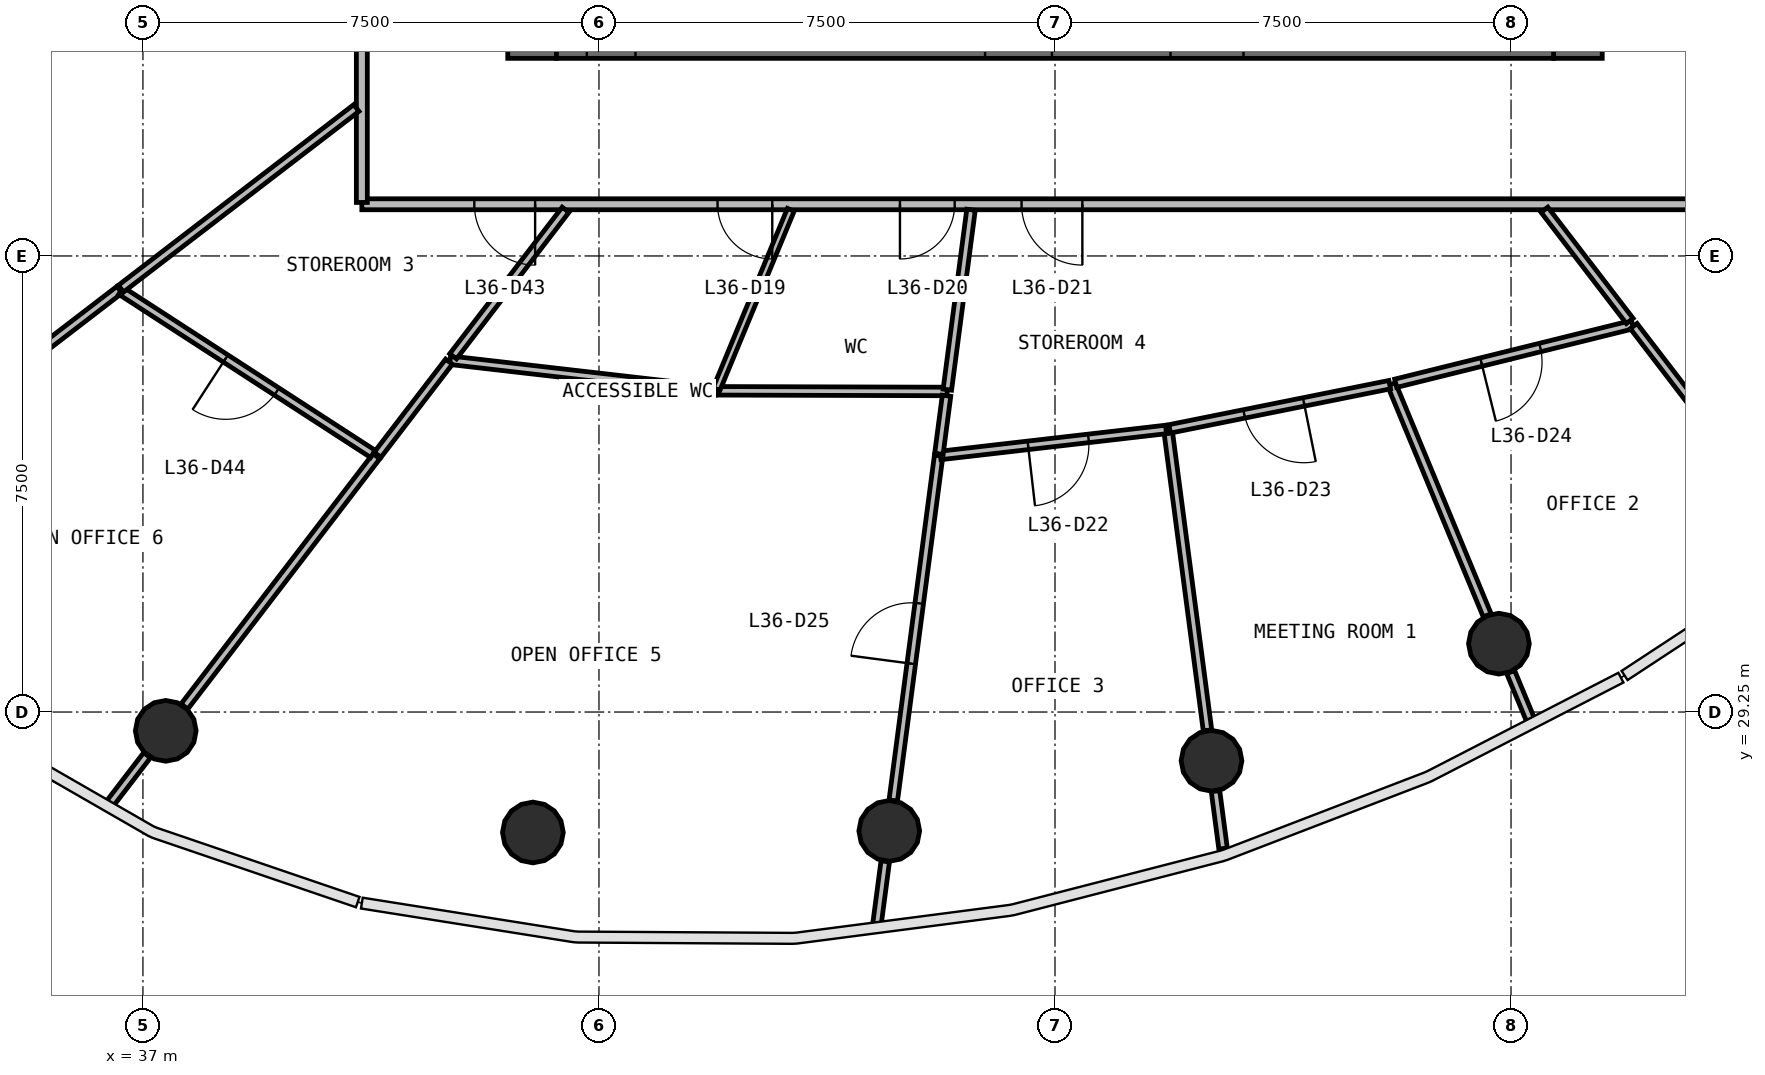
"""IFC4 building model, lengths in metres.
Left out: names, types, materials, properties, quantities, classifications, styles, units other than length and angle.
Written with IfcOpenShell. Run it as: python <this file> out.ifc"""

import sys

from ifc_helpers import new_model, si_unit, direction, frame, frame_2d, origin, origin_2d, place, context, subcontext, project, spatial, rectangle, circle, extrude, source, transform, mapped, element, fill, save


model = new_model("IFC4")
c1 = context("Model", 3, precision=1e-05, world=origin(), true_north=direction((0.0, 1.0)))
c2 = subcontext(c1, "Body", "Model", "MODEL_VIEW")
j1 = project(units=[si_unit("LENGTHUNIT", "METRE"), si_unit("PLANEANGLEUNIT", "RADIAN")], contexts=[c1])
p1 = place(None, origin())
s1 = spatial("IfcSite", under=j1, at=p1, CompositionType="ELEMENT")
p2 = place(p1, origin())
s2 = spatial("IfcBuilding", under=s1, at=p2, CompositionType="ELEMENT")
p3 = place(p2, frame((0.0, 0.0, 152.6)))
s3 = spatial("IfcBuildingStorey", under=s2, at=p3, CompositionType="ELEMENT", Elevation=152.6)
p4 = place(p3, frame((60.6, 40.0, 0.0), z_axis=(0.0, 0.0, 1.0), x_axis=(0.0, 1.0, 0.0)))
e1 = element("IfcWall", 1, at=p4, inside=s3, PredefinedType="SHEAR", context=c2, shape_type="SweptSolid", body=[
    extrude(rectangle(XDim=16.0, YDim=0.8, at=frame_2d((8.0, 0.0))), origin(), (0.0, 0.0, 1.0), 3.9),
])
p5 = place(p4, frame((7.1, 0.0, 0.0)))
e2 = element("IfcOpeningElement", 2, at=p5, cuts=e1, PredefinedType="OPENING", context=c2, shape_type="SweptSolid", body=[
    extrude(rectangle(XDim=1.8, YDim=2.1, at=frame_2d((0.9, 1.05))), frame((0.0, 0.41, 0.0), z_axis=(0.0, -1.0, 0.0), x_axis=(1.0, 0.0, 0.0)), (0.0, 0.0, 1.0), 0.82),
])
p6 = place(p3, frame((43.4, 56.0, 0.0), z_axis=(0.0, 0.0, 1.0), x_axis=(0.0, -1.0, 0.0)))
e3 = element("IfcWall", 3, at=p6, inside=s3, PredefinedType="SHEAR", context=c2, shape_type="SweptSolid", body=[
    extrude(rectangle(XDim=16.0, YDim=0.8, at=frame_2d((8.0, 0.0))), origin(), (0.0, 0.0, 1.0), 3.9),
])
p7 = place(p6, frame((7.1, 0.0, 0.0)))
e4 = element("IfcOpeningElement", 4, at=p7, cuts=e3, PredefinedType="OPENING", context=c2, shape_type="SweptSolid", body=[
    extrude(rectangle(XDim=1.8, YDim=2.1, at=frame_2d((0.9, 1.05))), frame((0.0, 0.41, 0.0), z_axis=(0.0, -1.0, 0.0), x_axis=(1.0, 0.0, 0.0)), (0.0, 0.0, 1.0), 0.82),
])
p8 = place(p3, frame((43.8, 40.4, 0.0), z_axis=(0.0, 0.0, 1.0), x_axis=(1.0, 0.0, 0.0)))
e5 = element("IfcWall", 5, at=p8, inside=s3, PredefinedType="SHEAR", context=c2, shape_type="SweptSolid", body=[
    extrude(rectangle(XDim=16.4, YDim=0.8, at=frame_2d((8.2, 0.0))), origin(), (0.0, 0.0, 1.0), 3.9),
])
p9 = place(p8, frame((10.1, 0.0, 0.0)))
e6 = element("IfcOpeningElement", 6, at=p9, cuts=e5, PredefinedType="OPENING", context=c2, shape_type="SweptSolid", body=[
    extrude(rectangle(XDim=1.2, YDim=2.1, at=frame_2d((0.6, 1.05))), frame((0.0, 0.41, 0.0), z_axis=(0.0, -1.0, 0.0), x_axis=(1.0, 0.0, 0.0)), (0.0, 0.0, 1.0), 0.82),
])
p10 = place(p8, frame((7.05, 0.0, 0.0)))
e7 = element("IfcOpeningElement", 7, at=p10, cuts=e5, PredefinedType="OPENING", context=c2, shape_type="SweptSolid", body=[
    extrude(rectangle(XDim=1.1, YDim=2.1, at=frame_2d((0.55, 1.05))), frame((0.0, 0.41, 0.0), z_axis=(0.0, -1.0, 0.0), x_axis=(1.0, 0.0, 0.0)), (0.0, 0.0, 1.0), 0.82),
])
p11 = place(p8, frame((0.5, 0.0, 0.0)))
e8 = element("IfcOpeningElement", 8, at=p11, cuts=e5, PredefinedType="OPENING", context=c2, shape_type="SweptSolid", body=[
    extrude(rectangle(XDim=0.8, YDim=2.1, at=frame_2d((0.4, 1.05))), frame((0.0, 0.41, 0.0), z_axis=(0.0, -1.0, 0.0), x_axis=(1.0, 0.0, 0.0)), (0.0, 0.0, 1.0), 0.82),
])
m1 = source(origin(), c2, "Body", "SweptSolid", [
    extrude(circle(Radius=0.5, at=origin_2d()), origin(), (0.0, 0.0, 1.0), 3.9),
])
for number, where, z_axis, x_axis in (
    (9, (37.375, 28.94, 0.0), (0.0, 0.0, 1.0), (1.0, 0.0, 0.0)),
    (10, (43.413, 27.269, 0.0), (0.0, 0.0, 1.0), (1.0, 0.0, 0.0)),
    (11, (49.274, 27.295, 0.0), (0.0, 0.0, 1.0), (1.0, 0.0, 0.0)),
    (12, (54.574, 28.449, 0.0), (0.0, 0.0, 1.0), (1.0, 0.0, 0.0)),
    (13, (59.301, 30.374, 0.0), (0.0, 0.0, 1.0), (1.0, 0.0, 0.0)),
):
    element("IfcColumn", number, at=place(p3, frame(where, z_axis=z_axis, x_axis=x_axis)), inside=s3, PredefinedType="COLUMN", context=c2, shape_type="MappedRepresentation", body=[
        mapped(m1, transform((0.0, 0.0, 0.0), scale=1.0)),
    ])
p12 = place(p3, frame((63.4, 37.6, 0.0), z_axis=(0.0, 0.0, 1.0), x_axis=(-1.0, 0.0, 0.0)))
e14 = element("IfcWall", 14, at=p12, inside=s3, PredefinedType="PARTITIONING", context=c2, shape_type="SweptSolid", body=[
    extrude(rectangle(XDim=22.8, YDim=0.18, at=frame_2d((11.4, 0.0))), origin(), (0.0, 0.0, 1.0), 2.88),
])
p13 = place(p12, frame((16.05, 0.0, 0.0)))
e15 = element("IfcOpeningElement", 15, at=p13, cuts=e14, PredefinedType="OPENING", context=c2, shape_type="SweptSolid", body=[
    extrude(rectangle(XDim=0.9, YDim=2.1, at=frame_2d((0.45, 1.05))), frame((0.0, 0.1, 0.0), z_axis=(0.0, -1.0, 0.0), x_axis=(1.0, 0.0, 0.0)), (0.0, 0.0, 1.0), 0.2),
])
p14 = place(p12, frame((13.05, 0.0, 0.0)))
e16 = element("IfcOpeningElement", 16, at=p14, cuts=e14, PredefinedType="OPENING", context=c2, shape_type="SweptSolid", body=[
    extrude(rectangle(XDim=0.9, YDim=2.1, at=frame_2d((0.45, 1.05))), frame((0.0, 0.1, 0.0), z_axis=(0.0, -1.0, 0.0), x_axis=(1.0, 0.0, 0.0)), (0.0, 0.0, 1.0), 0.2),
])
p15 = place(p12, frame((10.95, 0.0, 0.0)))
e17 = element("IfcOpeningElement", 17, at=p15, cuts=e14, PredefinedType="OPENING", context=c2, shape_type="SweptSolid", body=[
    extrude(rectangle(XDim=1.0, YDim=2.1, at=frame_2d((0.5, 1.05))), frame((0.0, 0.1, 0.0), z_axis=(0.0, -1.0, 0.0), x_axis=(1.0, 0.0, 0.0)), (0.0, 0.0, 1.0), 0.2),
])
p16 = place(p12, frame((19.95, 0.0, 0.0)))
e18 = element("IfcOpeningElement", 18, at=p16, cuts=e14, PredefinedType="OPENING", context=c2, shape_type="SweptSolid", body=[
    extrude(rectangle(XDim=1.0, YDim=2.1, at=frame_2d((0.5, 1.05))), frame((0.0, 0.1, 0.0), z_axis=(0.0, -1.0, 0.0), x_axis=(1.0, 0.0, 0.0)), (0.0, 0.0, 1.0), 0.2),
])
p17 = place(p3, frame((40.6, 37.63, 0.0), z_axis=(0.0, 0.0, 1.0), x_axis=(0.0, 1.0, 0.0)))
e19 = element("IfcWall", 19, at=p17, inside=s3, PredefinedType="PARTITIONING", context=c2, shape_type="SweptSolid", body=[
    extrude(rectangle(XDim=20.74, YDim=0.18, at=frame_2d((10.37, 0.0))), origin(), (0.0, 0.0, 1.0), 2.88),
])
p18 = place(p17, frame((9.89, 0.0, 0.0)))
e20 = element("IfcOpeningElement", 20, at=p18, cuts=e19, PredefinedType="OPENING", context=c2, shape_type="SweptSolid", body=[
    extrude(rectangle(XDim=1.0, YDim=2.1, at=frame_2d((0.5, 1.05))), frame((0.0, 0.1, 0.0), z_axis=(0.0, -1.0, 0.0), x_axis=(1.0, 0.0, 0.0)), (0.0, 0.0, 1.0), 0.2),
])
p19 = place(p17, frame((4.29, 0.0, 0.0)))
e21 = element("IfcOpeningElement", 21, at=p19, cuts=e19, PredefinedType="OPENING", context=c2, shape_type="SweptSolid", body=[
    extrude(rectangle(XDim=1.0, YDim=2.1, at=frame_2d((0.5, 1.05))), frame((0.0, 0.1, 0.0), z_axis=(0.0, -1.0, 0.0), x_axis=(1.0, 0.0, 0.0)), (0.0, 0.0, 1.0), 0.2),
])
p20 = place(p3, frame((49.34, 27.795, 0.0), z_axis=(0.0, 0.0, 1.0), x_axis=(0.13055608231, 0.99144092581, 0.0)))
e22 = element("IfcWall", 22, at=p20, inside=s3, PredefinedType="PARTITIONING", context=c2, shape_type="SweptSolid", body=[
    extrude(rectangle(XDim=5.72, YDim=0.14, at=frame_2d((2.86, 0.0))), origin(), (0.0, 0.0, 1.0), 2.88),
])
p21 = place(p20, frame((2.271, 0.0, 0.0)))
e23 = element("IfcOpeningElement", 23, at=p21, cuts=e22, PredefinedType="OPENING", context=c2, shape_type="SweptSolid", body=[
    extrude(rectangle(XDim=1.0, YDim=2.1, at=frame_2d((0.5, 1.05))), frame((0.0, 0.08, 0.0), z_axis=(0.0, -1.0, 0.0), x_axis=(1.0, 0.0, 0.0)), (0.0, 0.0, 1.0), 0.16),
])
p22 = place(p3, frame((40.841, 33.457, 0.0), z_axis=(0.0, 0.0, 1.0), x_axis=(-0.608780216018, -0.793338924159, 0.0)))
e24 = element("IfcWall", 24, at=p22, inside=s3, PredefinedType="PARTITIONING", context=c2, shape_type="SweptSolid", body=[
    extrude(rectangle(XDim=5.188, YDim=0.14, at=frame_2d((2.594, 0.0))), origin(), (0.0, 0.0, 1.0), 2.88),
])
p23 = place(p3, frame((36.614, 36.194, 0.0), z_axis=(0.0, 0.0, 1.0), x_axis=(-0.79337017358, -0.608739490811, 0.0)))
e25 = element("IfcWall", 25, at=p23, inside=s3, PredefinedType="PARTITIONING", context=c2, shape_type="SweptSolid", body=[
    extrude(rectangle(XDim=5.092, YDim=0.14, at=frame_2d((2.546, 0.0))), origin(), (0.0, 0.0, 1.0), 2.88),
])
p24 = place(p3, frame((40.782, 33.495, 0.0), z_axis=(0.0, 0.0, 1.0), x_axis=(-0.839336490457, 0.543612229247, 0.0)))
e26 = element("IfcWall", 26, at=p24, inside=s3, PredefinedType="PARTITIONING", context=c2, shape_type="SweptSolid", body=[
    extrude(rectangle(XDim=4.935, YDim=0.14, at=frame_2d((2.468, 0.0))), origin(), (0.0, 0.0, 1.0), 2.88),
])
p25 = place(p24, frame((1.885, 0.0, 0.0)))
e27 = element("IfcOpeningElement", 27, at=p25, cuts=e26, PredefinedType="OPENING", context=c2, shape_type="SweptSolid", body=[
    extrude(rectangle(XDim=1.0, YDim=2.1, at=frame_2d((0.5, 1.05))), frame((0.0, 0.08, 0.0), z_axis=(0.0, -1.0, 0.0), x_axis=(1.0, 0.0, 0.0)), (0.0, 0.0, 1.0), 0.16),
])
p26 = place(p3, frame((40.51, 39.183, 0.0), z_axis=(0.0, 0.0, 1.0), x_axis=(-0.793354275357, -0.608760210405, 0.0)))
e28 = element("IfcWall", 28, at=p26, inside=s3, PredefinedType="PARTITIONING", context=c2, shape_type="SweptSolid", body=[
    extrude(rectangle(XDim=4.88, YDim=0.14, at=frame_2d((2.44, 0.0))), origin(), (0.0, 0.0, 1.0), 2.88),
])
p27 = place(p3, frame((53.856, 33.9, 0.0), z_axis=(0.0, 0.0, 1.0), x_axis=(0.130517737487, -0.991445974424, 0.0)))
e29 = element("IfcWall", 29, at=p27, inside=s3, PredefinedType="PARTITIONING", context=c2, shape_type="SweptSolid", body=[
    extrude(rectangle(XDim=4.994, YDim=0.14, at=frame_2d((2.497, 0.0))), origin(), (0.0, 0.0, 1.0), 2.88),
])
p28 = place(p3, frame((42.052, 35.035, 0.0), z_axis=(0.0, 0.0, 1.0), x_axis=(0.993448498383, -0.114280711669, 0.0)))
e30 = element("IfcWall", 30, at=p28, inside=s3, PredefinedType="PARTITIONING", context=c2, shape_type="SweptSolid", body=[
    extrude(rectangle(XDim=4.399, YDim=0.14, at=frame_2d((2.199, 0.0))), origin(), (0.0, 0.0, 1.0), 2.88),
])
p29 = place(p3, frame((57.534, 34.639, 0.0), z_axis=(0.0, 0.0, 1.0), x_axis=(0.382696163026, -0.923874259196, 0.0)))
e31 = element("IfcWall", 31, at=p29, inside=s3, PredefinedType="PARTITIONING", context=c2, shape_type="SweptSolid", body=[
    extrude(rectangle(XDim=4.112, YDim=0.14, at=frame_2d((2.056, 0.0))), origin(), (0.0, 0.0, 1.0), 2.88),
])
p30 = place(p3, frame((61.499, 35.621, 0.0), z_axis=(0.0, 0.0, 1.0), x_axis=(-0.970705214058, -0.240273567836, 0.0)))
e32 = element("IfcWall", 32, at=p30, inside=s3, PredefinedType="PARTITIONING", context=c2, shape_type="SweptSolid", body=[
    extrude(rectangle(XDim=4.014, YDim=0.14, at=frame_2d((2.007, 0.0))), origin(), (0.0, 0.0, 1.0), 2.88),
])
p31 = place(p30, frame((1.563, 0.0, 0.0)))
e33 = element("IfcOpeningElement", 33, at=p31, cuts=e32, PredefinedType="OPENING", context=c2, shape_type="SweptSolid", body=[
    extrude(rectangle(XDim=1.0, YDim=2.1, at=frame_2d((0.5, 1.05))), frame((0.0, 0.08, 0.0), z_axis=(0.0, -1.0, 0.0), x_axis=(1.0, 0.0, 0.0)), (0.0, 0.0, 1.0), 0.16),
])
p32 = place(p3, frame((46.452, 34.532, 0.0), z_axis=(0.0, 0.0, 1.0), x_axis=(0.999995948964, -0.002846411033, 0.0)))
e34 = element("IfcWall", 34, at=p32, inside=s3, PredefinedType="PARTITIONING", context=c2, shape_type="SweptSolid", body=[
    extrude(rectangle(XDim=3.774, YDim=0.14, at=frame_2d((1.887, 0.0))), origin(), (0.0, 0.0, 1.0), 2.88),
])
p33 = place(p3, frame((53.826, 33.897, 0.0), z_axis=(0.0, 0.0, 1.0), x_axis=(-0.993434107381, -0.114405744138, 0.0)))
e35 = element("IfcWall", 35, at=p33, inside=s3, PredefinedType="PARTITIONING", context=c2, shape_type="SweptSolid", body=[
    extrude(rectangle(XDim=3.734, YDim=0.14, at=frame_2d((1.867, 0.0))), origin(), (0.0, 0.0, 1.0), 2.88),
])
p34 = place(p33, frame((1.285, 0.0, 0.0)))
e36 = element("IfcOpeningElement", 36, at=p34, cuts=e35, PredefinedType="OPENING", context=c2, shape_type="SweptSolid", body=[
    extrude(rectangle(XDim=1.0, YDim=2.1, at=frame_2d((0.5, 1.05))), frame((0.0, 0.08, 0.0), z_axis=(0.0, -1.0, 0.0), x_axis=(1.0, 0.0, 0.0)), (0.0, 0.0, 1.0), 0.16),
])
p35 = place(p3, frame((57.505, 34.634, 0.0), z_axis=(0.0, 0.0, 1.0), x_axis=(-0.980399657824, -0.197019062376, 0.0)))
e37 = element("IfcWall", 37, at=p35, inside=s3, PredefinedType="PARTITIONING", context=c2, shape_type="SweptSolid", body=[
    extrude(rectangle(XDim=3.691, YDim=0.14, at=frame_2d((1.846, 0.0))), origin(), (0.0, 0.0, 1.0), 2.88),
])
p36 = place(p35, frame((1.441, 0.0, 0.0)))
e38 = element("IfcOpeningElement", 38, at=p36, cuts=e37, PredefinedType="OPENING", context=c2, shape_type="SweptSolid", body=[
    extrude(rectangle(XDim=1.0, YDim=2.1, at=frame_2d((0.5, 1.05))), frame((0.0, 0.08, 0.0), z_axis=(0.0, -1.0, 0.0), x_axis=(1.0, 0.0, 0.0)), (0.0, 0.0, 1.0), 0.16),
])
p37 = place(p3, frame((43.951, 37.51, 0.0), z_axis=(0.0, 0.0, 1.0), x_axis=(-0.608758797461, -0.793355359542, 0.0)))
e39 = element("IfcWall", 39, at=p37, inside=s3, PredefinedType="PARTITIONING", context=c2, shape_type="SweptSolid", body=[
    extrude(rectangle(XDim=3.038, YDim=0.14, at=frame_2d((1.519, 0.0))), origin(), (0.0, 0.0, 1.0), 2.88),
])
p38 = place(p3, frame((50.619, 37.51, 0.0), z_axis=(0.0, 0.0, 1.0), x_axis=(-0.13049684078, -0.991448725122, 0.0)))
e40 = element("IfcWall", 40, at=p38, inside=s3, PredefinedType="PARTITIONING", context=c2, shape_type="SweptSolid", body=[
    extrude(rectangle(XDim=2.984, YDim=0.14, at=frame_2d((1.492, 0.0))), origin(), (0.0, 0.0, 1.0), 2.88),
])
p39 = place(p3, frame((61.517, 35.597, 0.0), z_axis=(0.0, 0.0, 1.0), x_axis=(0.608716333524, -0.793387941238, 0.0)))
e41 = element("IfcWall", 41, at=p39, inside=s3, PredefinedType="PARTITIONING", context=c2, shape_type="SweptSolid", body=[
    extrude(rectangle(XDim=2.825, YDim=0.14, at=frame_2d((1.413, 0.0))), origin(), (0.0, 0.0, 1.0), 2.88),
])
p40 = place(p3, frame((60.049, 37.51, 0.0), z_axis=(0.0, 0.0, 1.0), x_axis=(0.608742818772, -0.793367620081, 0.0)))
e42 = element("IfcWall", 42, at=p40, inside=s3, PredefinedType="PARTITIONING", context=c2, shape_type="SweptSolid", body=[
    extrude(rectangle(XDim=2.305, YDim=0.14, at=frame_2d((1.152, 0.0))), origin(), (0.0, 0.0, 1.0), 2.88),
])
p41 = place(p3, frame((42.033, 35.011, 0.0), z_axis=(0.0, 0.0, 1.0), x_axis=(-0.608750262105, -0.793361908833, 0.0)))
e43 = element("IfcWall", 43, at=p41, inside=s3, PredefinedType="PARTITIONING", context=c2, shape_type="SweptSolid", body=[
    extrude(rectangle(XDim=1.929, YDim=0.14, at=frame_2d((0.965, 0.0))), origin(), (0.0, 0.0, 1.0), 2.88),
])
p42 = place(p3, frame((50.216, 34.452, 0.0), z_axis=(0.0, 0.0, 1.0), x_axis=(-0.130454512571, -0.991454295543, 0.0)))
e44 = element("IfcWall", 44, at=p42, inside=s3, PredefinedType="PARTITIONING", context=c2, shape_type="SweptSolid", body=[
    extrude(rectangle(XDim=0.964, YDim=0.14, at=frame_2d((0.482, 0.0))), origin(), (0.0, 0.0, 1.0), 2.88),
])
p43 = place(p3, frame((49.208, 26.795, 0.0), z_axis=(0.0, 0.0, 1.0), x_axis=(-0.130569518357, -0.991439156417, 0.0)))
e45 = element("IfcWall", 45, at=p43, inside=s3, PredefinedType="PARTITIONING", context=c2, shape_type="SweptSolid", body=[
    extrude(rectangle(XDim=1.043, YDim=0.14, at=frame_2d((0.522, 0.0))), origin(), (0.0, 0.0, 1.0), 2.88),
])
p44 = place(p3, frame((37.068, 28.54, 0.0), z_axis=(0.0, 0.0, 1.0), x_axis=(-0.608815264587, -0.793312027897, 0.0)))
e46 = element("IfcWall", 46, at=p44, inside=s3, PredefinedType="PARTITIONING", context=c2, shape_type="SweptSolid", body=[
    extrude(rectangle(XDim=1.015, YDim=0.14, at=frame_2d((0.507, 0.0))), origin(), (0.0, 0.0, 1.0), 2.88),
])
p45 = place(p3, frame((54.64, 27.948, 0.0), z_axis=(0.0, 0.0, 1.0), x_axis=(0.130434626054, -0.991456911987, 0.0)))
e47 = element("IfcWall", 47, at=p45, inside=s3, PredefinedType="PARTITIONING", context=c2, shape_type="SweptSolid", body=[
    extrude(rectangle(XDim=0.953, YDim=0.14, at=frame_2d((0.476, 0.0))), origin(), (0.0, 0.0, 1.0), 2.88),
])
p46 = place(p3, frame((59.494, 29.908, 0.0), z_axis=(0.0, 0.0, 1.0), x_axis=(0.382722863119, -0.923863198772, 0.0)))
e48 = element("IfcWall", 48, at=p46, inside=s3, PredefinedType="PARTITIONING", context=c2, shape_type="SweptSolid", body=[
    extrude(rectangle(XDim=0.852, YDim=0.14, at=frame_2d((0.426, 0.0))), origin(), (0.0, 0.0, 1.0), 2.88),
])
p47 = place(p3, frame((47.655, 37.51, 0.0), z_axis=(0.0, 0.0, 1.0), x_axis=(-0.382648952505, -0.923893813783, 0.0)))
e49 = element("IfcWall", 49, at=p47, inside=s3, PredefinedType="PARTITIONING", context=c2, shape_type="SweptSolid", body=[
    extrude(rectangle(XDim=3.193, YDim=0.12, at=frame_2d((1.596, 0.0))), origin(), (0.0, 0.0, 1.0), 2.88),
])
m2 = source(origin(), c2, "Body", "SweptSolid", [
    extrude(rectangle(XDim=0.9, YDim=2.1, at=frame_2d((0.45, 1.05))), frame((0.0, 0.025, 0.0), z_axis=(0.0, -1.0, 0.0), x_axis=(1.0, 0.0, 0.0)), (0.0, 0.0, 1.0), 0.05),
])
p48 = place(p13, origin())
e50 = element("IfcDoor", 50, at=p48, inside=s3, OperationType="SINGLE_SWING_LEFT", PredefinedType="DOOR", context=c2, shape_type="MappedRepresentation", body=[
    mapped(m2, transform((0.0, 0.0, 0.0), scale=1.0)),
])
fill(e15, e50)
p49 = place(p14, origin())
e51 = element("IfcDoor", 51, at=p49, inside=s3, OperationType="SINGLE_SWING_RIGHT", PredefinedType="DOOR", context=c2, shape_type="MappedRepresentation", body=[
    mapped(m2, transform((0.0, 0.0, 0.0), scale=1.0)),
])
fill(e16, e51)
m3 = source(origin(), c2, "Body", "SweptSolid", [
    extrude(rectangle(XDim=1.0, YDim=2.1, at=frame_2d((0.5, 1.05))), frame((0.0, 0.025, 0.0), z_axis=(0.0, -1.0, 0.0), x_axis=(1.0, 0.0, 0.0)), (0.0, 0.0, 1.0), 0.05),
])
p50 = place(p15, origin())
e52 = element("IfcDoor", 52, at=p50, inside=s3, OperationType="SINGLE_SWING_LEFT", PredefinedType="DOOR", context=c2, shape_type="MappedRepresentation", body=[
    mapped(m3, transform((0.0, 0.0, 0.0), scale=1.0)),
])
fill(e17, e52)
p51 = place(p34, origin())
e53 = element("IfcDoor", 53, at=p51, inside=s3, OperationType="SINGLE_SWING_RIGHT", PredefinedType="DOOR", context=c2, shape_type="MappedRepresentation", body=[
    mapped(m3, transform((0.0, 0.0, 0.0), scale=1.0)),
])
fill(e36, e53)
p52 = place(p36, origin())
e54 = element("IfcDoor", 54, at=p52, inside=s3, OperationType="SINGLE_SWING_LEFT", PredefinedType="DOOR", context=c2, shape_type="MappedRepresentation", body=[
    mapped(m3, transform((0.0, 0.0, 0.0), scale=1.0)),
])
fill(e38, e54)
p53 = place(p31, origin())
e55 = element("IfcDoor", 55, at=p53, inside=s3, OperationType="SINGLE_SWING_RIGHT", PredefinedType="DOOR", context=c2, shape_type="MappedRepresentation", body=[
    mapped(m3, transform((0.0, 0.0, 0.0), scale=1.0)),
])
fill(e33, e55)
p54 = place(p21, origin())
e56 = element("IfcDoor", 56, at=p54, inside=s3, OperationType="SINGLE_SWING_LEFT", PredefinedType="DOOR", context=c2, shape_type="MappedRepresentation", body=[
    mapped(m3, transform((0.0, 0.0, 0.0), scale=1.0)),
])
fill(e23, e56)
p55 = place(p16, origin())
e57 = element("IfcDoor", 57, at=p55, inside=s3, OperationType="SINGLE_SWING_LEFT", PredefinedType="DOOR", context=c2, shape_type="MappedRepresentation", body=[
    mapped(m3, transform((0.0, 0.0, 0.0), scale=1.0)),
])
fill(e18, e57)
p56 = place(p25, origin())
e58 = element("IfcDoor", 58, at=p56, inside=s3, OperationType="SINGLE_SWING_RIGHT", PredefinedType="DOOR", context=c2, shape_type="MappedRepresentation", body=[
    mapped(m3, transform((0.0, 0.0, 0.0), scale=1.0)),
])
fill(e27, e58)
save(model, sys.argv[1])
